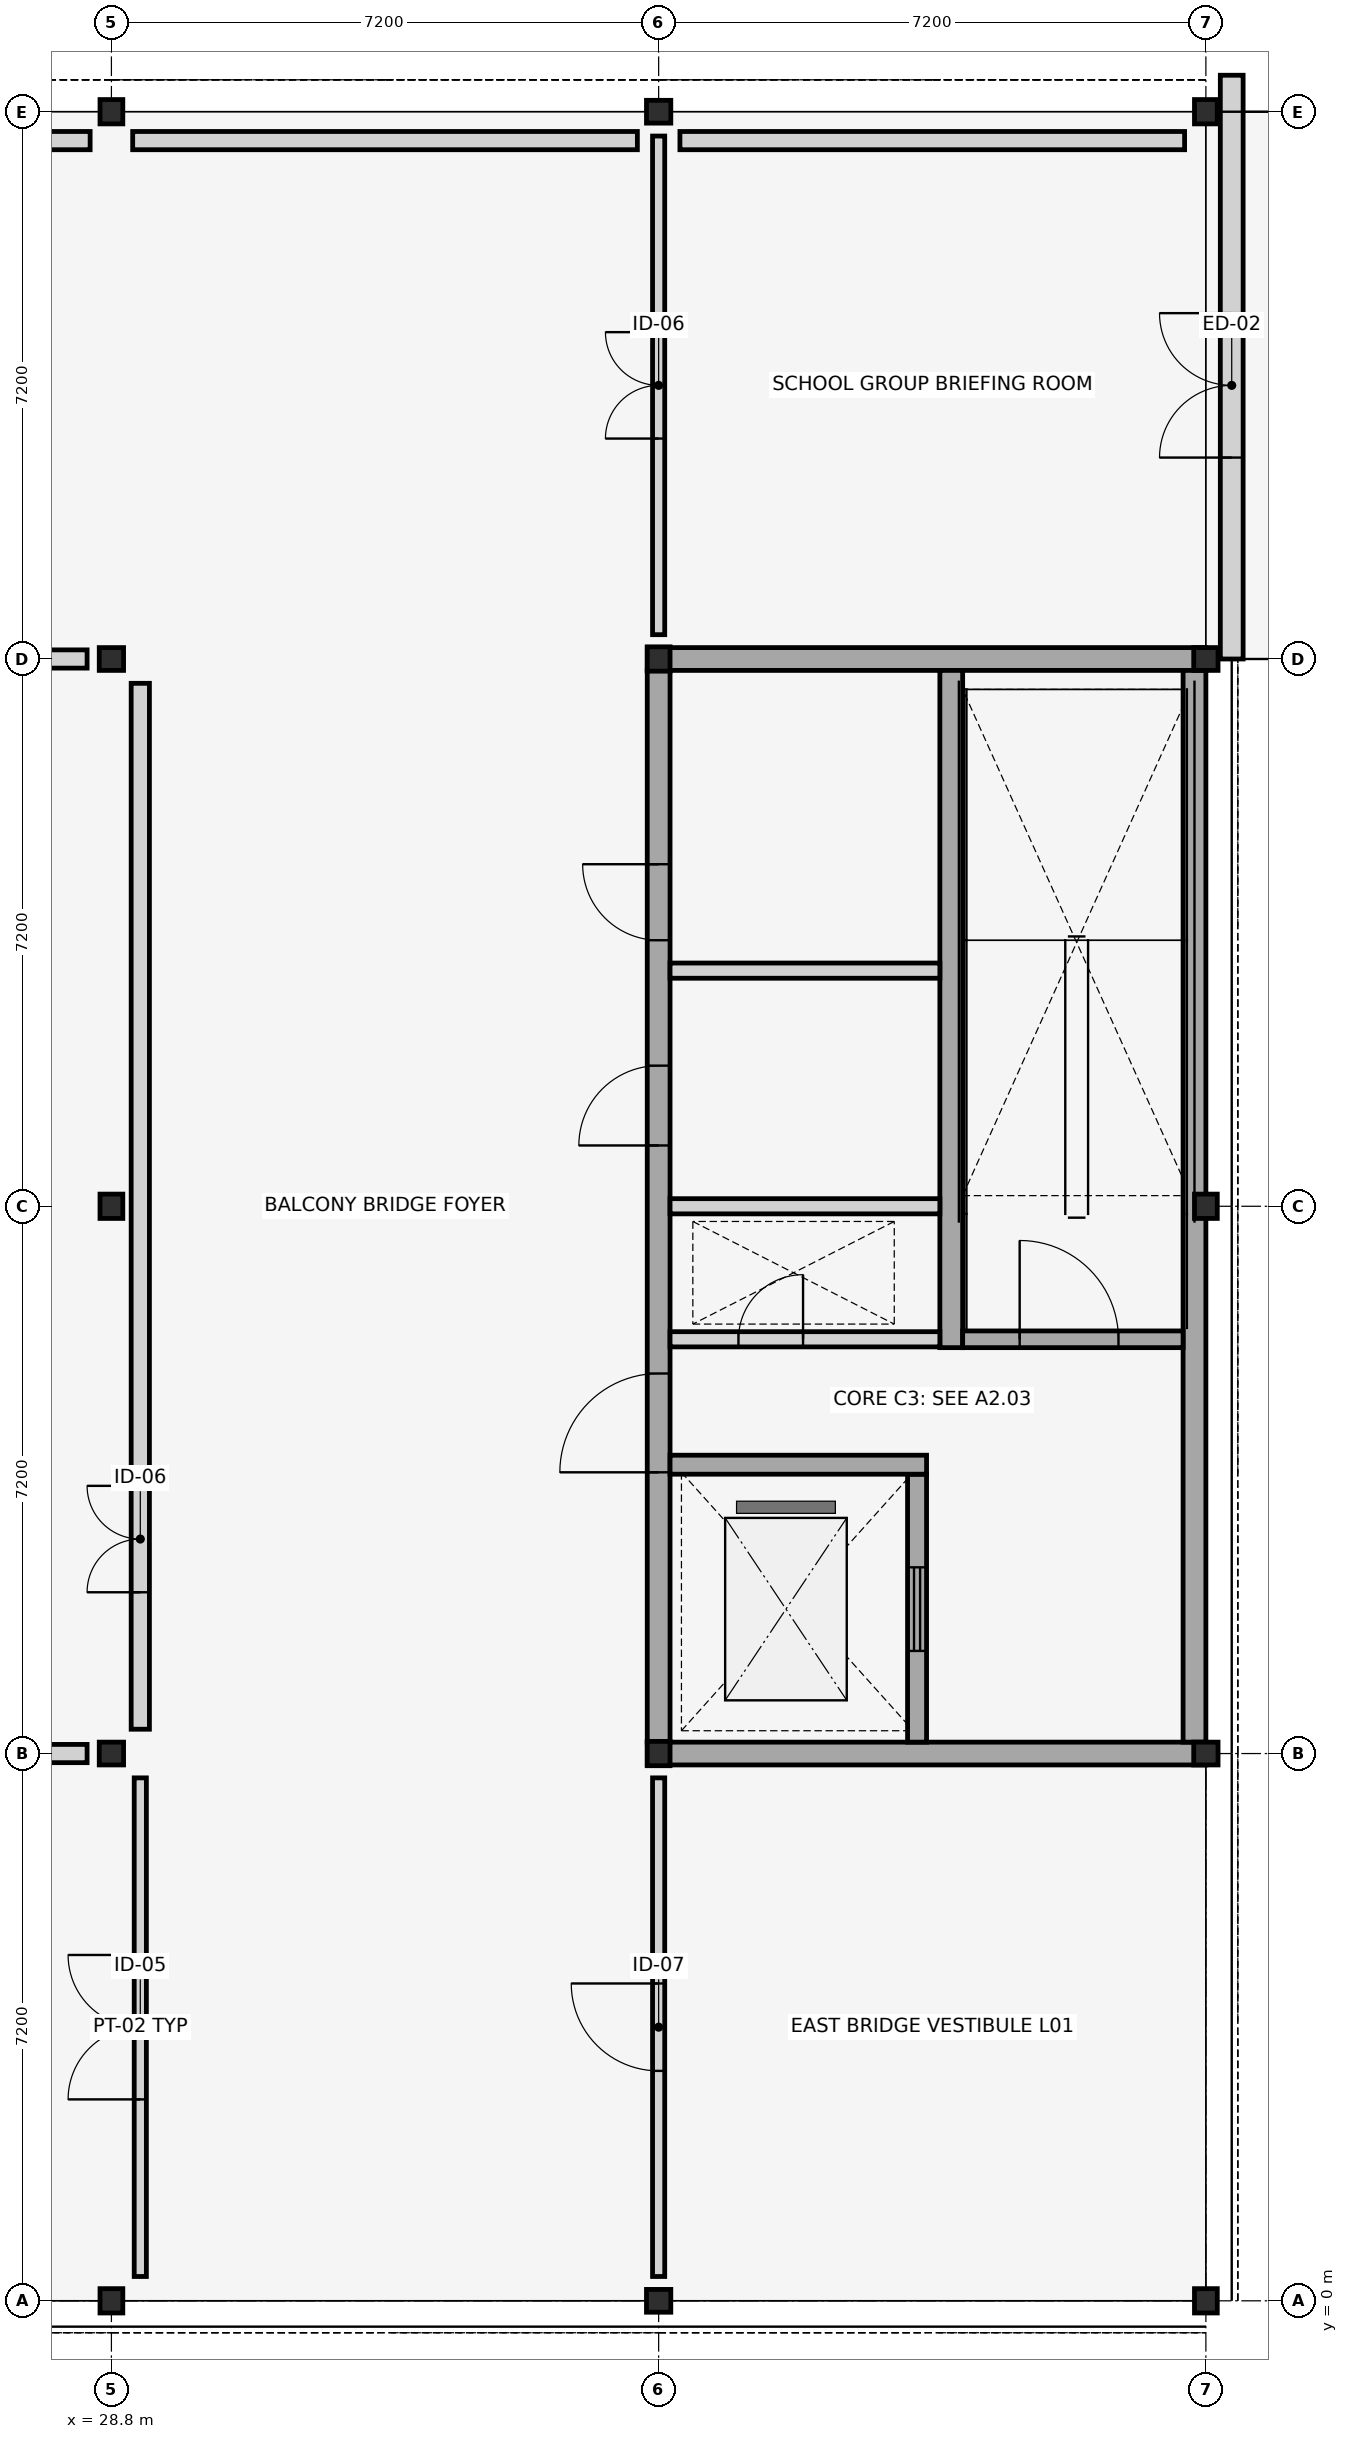
"""IFC4 building model, lengths in metres.
Left out: names, types, materials, properties, quantities, classifications, styles, units other than length and angle.
Written with IfcOpenShell. Run it as: python <this file> out.ifc"""

import sys

from ifc_helpers import new_model, si_unit, direction, frame, frame_2d, origin, origin_2d, place, context, subcontext, project, spatial, rectangle, i_section, extrude, element, fill, save


model = new_model("IFC4")
c1 = context("Model", 3, precision=1e-05, world=origin(), true_north=direction((0.0, 1.0)))
c2 = subcontext(c1, "Body", "Model", "MODEL_VIEW")
j1 = project(units=[si_unit("LENGTHUNIT", "METRE"), si_unit("PLANEANGLEUNIT", "RADIAN")], contexts=[c1])
p1 = place(None, origin())
s1 = spatial("IfcSite", under=j1, at=p1, CompositionType="ELEMENT")
p2 = place(p1, origin())
s2 = spatial("IfcBuilding", under=s1, at=p2, CompositionType="ELEMENT")
p3 = place(p2, frame((0.0, 0.0, 4.5)))
s3 = spatial("IfcBuildingStorey", under=s2, at=p3, CompositionType="ELEMENT", Elevation=4.5)
for number, where, z_axis, x_axis in (
    (1, (28.8, 0.0, 0.0), (0.0, 0.0, 1.0), (1.0, 0.0, 0.0)),
    (2, (28.8, 7.2, 0.0), (0.0, 0.0, 1.0), (0.0, 1.0, 0.0)),
    (3, (28.8, 14.4, 0.0), (0.0, 0.0, 1.0), (1.0, 0.0, 0.0)),
    (4, (28.8, 21.6, 0.0), (0.0, 0.0, 1.0), (0.0, 1.0, 0.0)),
    (5, (28.8, 28.8, 0.0), (0.0, 0.0, 1.0), (1.0, 0.0, 0.0)),
    (6, (36.0, 0.0, 0.0), (0.0, 0.0, 1.0), (0.0, 1.0, 0.0)),
    (7, (36.0, 7.2, 0.0), (0.0, 0.0, 1.0), (1.0, 0.0, 0.0)),
    (8, (36.0, 21.6, 0.0), (0.0, 0.0, 1.0), (1.0, 0.0, 0.0)),
    (9, (36.0, 28.8, 0.0), (0.0, 0.0, 1.0), (0.0, 1.0, 0.0)),
    (10, (43.2, 0.0, 0.0), (0.0, 0.0, 1.0), (1.0, 0.0, 0.0)),
    (11, (43.2, 7.2, 0.0), (0.0, 0.0, 1.0), (0.0, 1.0, 0.0)),
    (12, (43.2, 14.4, 0.0), (0.0, 0.0, 1.0), (1.0, 0.0, 0.0)),
    (13, (43.2, 21.6, 0.0), (0.0, 0.0, 1.0), (0.0, 1.0, 0.0)),
    (14, (43.2, 28.8, 0.0), (0.0, 0.0, 1.0), (1.0, 0.0, 0.0)),
):
    element("IfcColumn", number, at=place(p3, frame(where, z_axis=z_axis, x_axis=x_axis)), inside=s3, PredefinedType="COLUMN", context=c2, shape_type="SweptSolid", body=[
        extrude(i_section(OverallWidth=0.3, OverallDepth=0.32, WebThickness=0.011, FlangeThickness=0.021, FilletRadius=0.027, at=origin_2d()), origin(), (0.0, 0.0, 1.0), 4.2),
    ])
p4 = place(p3, frame((43.54, 21.6, 0.0), z_axis=(0.0, 0.0, 1.0), x_axis=(0.0, 1.0, 0.0)))
e15 = element("IfcWall", 15, at=p4, inside=s3, PredefinedType="STANDARD", context=c2, shape_type="SweptSolid", body=[
    extrude(rectangle(XDim=7.68, YDim=0.3, at=frame_2d((3.84, 0.0))), origin(), (0.0, 0.0, 1.0), 3.65),
])
p5 = place(p4, frame((2.65, 0.0, 0.0)))
e16 = element("IfcOpeningElement", 16, at=p5, cuts=e15, PredefinedType="OPENING", context=c2, shape_type="SweptSolid", body=[
    extrude(rectangle(XDim=1.9, YDim=2.45, at=frame_2d((0.95, 1.225))), frame((0.0, 0.16, 0.0), z_axis=(0.0, -1.0, 0.0), x_axis=(1.0, 0.0, 0.0)), (0.0, 0.0, 1.0), 0.32),
])
for number, where, z_axis, x_axis in (
    (17, (42.92, 28.42, 0.0), (0.0, 0.0, 1.0), (-1.0, 0.0, 0.0)),
    (18, (35.72, 28.42, 0.0), (0.0, 0.0, 1.0), (-1.0, 0.0, 0.0)),
):
    element("IfcWall", number, at=place(p3, frame(where, z_axis=z_axis, x_axis=x_axis)), inside=s3, PredefinedType="STANDARD", context=c2, shape_type="SweptSolid", body=[
        extrude(rectangle(XDim=6.64, YDim=0.24, at=frame_2d((3.32, 0.0))), origin(), (0.0, 0.0, 1.0), 3.58),
    ])
p6 = place(p3, frame((28.52, 28.42, 0.0), z_axis=(0.0, 0.0, 1.0), x_axis=(-1.0, 0.0, 0.0)))
e19 = element("IfcWall", 19, at=p6, inside=s3, PredefinedType="STANDARD", context=c2, shape_type="SweptSolid", body=[
    extrude(rectangle(XDim=6.64, YDim=0.24, at=frame_2d((3.32, 0.0))), origin(), (0.0, 0.0, 1.0), 3.58),
])
for number, where, z_axis, x_axis in (
    (20, (35.85, 7.2, 0.0), (0.0, 0.0, 1.0), (1.0, 0.0, 0.0)),
    (21, (35.85, 21.6, 0.0), (0.0, 0.0, 1.0), (1.0, 0.0, 0.0)),
):
    element("IfcWall", number, at=place(p3, frame(where, z_axis=z_axis, x_axis=x_axis)), inside=s3, PredefinedType="SHEAR", context=c2, shape_type="SweptSolid", body=[
        extrude(rectangle(XDim=7.35, YDim=0.3, at=frame_2d((3.675, 0.0))), origin(), (0.0, 0.0, 1.0), 3.98),
    ])
p7 = place(p3, frame((43.05, 7.35, 0.0), z_axis=(0.0, 0.0, 1.0), x_axis=(0.0, 1.0, 0.0)))
e22 = element("IfcWall", 22, at=p7, inside=s3, PredefinedType="SHEAR", context=c2, shape_type="SweptSolid", body=[
    extrude(rectangle(XDim=14.1, YDim=0.3, at=frame_2d((7.05, 0.0))), origin(), (0.0, 0.0, 1.0), 3.98),
])
p8 = place(p3, frame((36.0, 7.35, 0.0), z_axis=(0.0, 0.0, 1.0), x_axis=(0.0, 1.0, 0.0)))
e23 = element("IfcWall", 23, at=p8, inside=s3, PredefinedType="SHEAR", context=c2, shape_type="SweptSolid", body=[
    extrude(rectangle(XDim=14.1, YDim=0.3, at=frame_2d((7.05, 0.0))), origin(), (0.0, 0.0, 1.0), 3.98),
])
p9 = place(p8, frame((3.55, 0.0, 0.0)))
e24 = element("IfcOpeningElement", 24, at=p9, cuts=e23, PredefinedType="OPENING", context=c2, shape_type="SweptSolid", body=[
    extrude(rectangle(XDim=1.3, YDim=2.2, at=frame_2d((0.65, 1.1))), frame((0.0, 0.16, 0.0), z_axis=(0.0, -1.0, 0.0), x_axis=(1.0, 0.0, 0.0)), (0.0, 0.0, 1.0), 0.32),
])
p10 = place(p8, frame((7.85, 0.0, 0.0)))
e25 = element("IfcOpeningElement", 25, at=p10, cuts=e23, PredefinedType="OPENING", context=c2, shape_type="SweptSolid", body=[
    extrude(rectangle(XDim=1.05, YDim=2.15, at=frame_2d((0.525, 1.075))), frame((0.0, 0.16, 0.0), z_axis=(0.0, -1.0, 0.0), x_axis=(1.0, 0.0, 0.0)), (0.0, 0.0, 1.0), 0.32),
])
p11 = place(p8, frame((10.55, 0.0, 0.0)))
e26 = element("IfcOpeningElement", 26, at=p11, cuts=e23, PredefinedType="OPENING", context=c2, shape_type="SweptSolid", body=[
    extrude(rectangle(XDim=1.0, YDim=2.15, at=frame_2d((0.5, 1.075))), frame((0.0, 0.16, 0.0), z_axis=(0.0, -1.0, 0.0), x_axis=(1.0, 0.0, 0.0)), (0.0, 0.0, 1.0), 0.32),
])
p12 = place(p3, frame((39.4, 7.35, 0.0), z_axis=(0.0, 0.0, 1.0), x_axis=(0.0, 1.0, 0.0)))
e27 = element("IfcWall", 27, at=p12, inside=s3, PredefinedType="SHEAR", context=c2, shape_type="SweptSolid", body=[
    extrude(rectangle(XDim=3.525, YDim=0.25, at=frame_2d((1.762, 0.0))), origin(), (0.0, 0.0, 1.0), 3.98),
])
p13 = place(p12, frame((1.2, 0.0, 0.0)))
e28 = element("IfcOpeningElement", 28, at=p13, cuts=e27, PredefinedType="OPENING", context=c2, shape_type="SweptSolid", body=[
    extrude(rectangle(XDim=1.1, YDim=2.15, at=frame_2d((0.55, 1.075))), frame((0.0, 0.135, 0.0), z_axis=(0.0, -1.0, 0.0), x_axis=(1.0, 0.0, 0.0)), (0.0, 0.0, 1.0), 0.27),
])
p14 = place(p3, frame((39.85, 12.54, 0.0), z_axis=(0.0, 0.0, 1.0), x_axis=(0.0, 1.0, 0.0)))
e29 = element("IfcWall", 29, at=p14, inside=s3, PredefinedType="SHEAR", context=c2, shape_type="SweptSolid", body=[
    extrude(rectangle(XDim=8.91, YDim=0.3, at=frame_2d((4.455, 0.0))), origin(), (0.0, 0.0, 1.0), 3.98),
])
p15 = place(p3, frame((36.15, 12.65, 0.0), z_axis=(0.0, 0.0, 1.0), x_axis=(1.0, 0.0, 0.0)))
e30 = element("IfcWall", 30, at=p15, inside=s3, PredefinedType="PLUMBINGWALL", context=c2, shape_type="SweptSolid", body=[
    extrude(rectangle(XDim=3.55, YDim=0.2, at=frame_2d((1.775, 0.0))), origin(), (0.0, 0.0, 1.0), 3.4),
])
p16 = place(p15, frame((0.9, 0.0, 0.0)))
e31 = element("IfcOpeningElement", 31, at=p16, cuts=e30, PredefinedType="OPENING", context=c2, shape_type="SweptSolid", body=[
    extrude(rectangle(XDim=0.85, YDim=2.05, at=frame_2d((0.425, 1.025))), frame((0.0, 0.11, 0.0), z_axis=(0.0, -1.0, 0.0), x_axis=(1.0, 0.0, 0.0)), (0.0, 0.0, 1.0), 0.22),
])
p17 = place(p3, frame((40.0, 12.65, 0.0), z_axis=(0.0, 0.0, 1.0), x_axis=(1.0, 0.0, 0.0)))
e32 = element("IfcWall", 32, at=p17, inside=s3, PredefinedType="SHEAR", context=c2, shape_type="SweptSolid", body=[
    extrude(rectangle(XDim=2.9, YDim=0.22, at=frame_2d((1.45, 0.0))), origin(), (0.0, 0.0, 1.0), 3.98),
])
p18 = place(p17, frame((0.75, 0.0, 0.0)))
e33 = element("IfcOpeningElement", 33, at=p18, cuts=e32, PredefinedType="OPENING", context=c2, shape_type="SweptSolid", body=[
    extrude(rectangle(XDim=1.3, YDim=2.2, at=frame_2d((0.65, 1.1))), frame((0.0, 0.12, 0.0), z_axis=(0.0, -1.0, 0.0), x_axis=(1.0, 0.0, 0.0)), (0.0, 0.0, 1.0), 0.24),
])
p19 = place(p3, frame((36.15, 11.0, 0.0), z_axis=(0.0, 0.0, 1.0), x_axis=(1.0, 0.0, 0.0)))
e34 = element("IfcWall", 34, at=p19, inside=s3, PredefinedType="SHEAR", context=c2, shape_type="SweptSolid", body=[
    extrude(rectangle(XDim=3.375, YDim=0.25, at=frame_2d((1.688, 0.0))), origin(), (0.0, 0.0, 1.0), 3.98),
])
for number, where, z_axis, x_axis in (
    (35, (36.15, 14.4, 0.0), (0.0, 0.0, 1.0), (1.0, 0.0, 0.0)),
    (36, (36.15, 17.5, 0.0), (0.0, 0.0, 1.0), (1.0, 0.0, 0.0)),
):
    element("IfcWall", number, at=place(p3, frame(where, z_axis=z_axis, x_axis=x_axis)), inside=s3, PredefinedType="PLUMBINGWALL", context=c2, shape_type="SweptSolid", body=[
        extrude(rectangle(XDim=3.55, YDim=0.2, at=frame_2d((1.775, 0.0))), origin(), (0.0, 0.0, 1.0), 3.4),
    ])
p20 = place(p3, frame((7.52, 7.2, 0.0), z_axis=(0.0, 0.0, 1.0), x_axis=(1.0, 0.0, 0.0)))
e37 = element("IfcWall", 37, at=p20, inside=s3, PredefinedType="PARTITIONING", context=c2, shape_type="SweptSolid", body=[
    extrude(rectangle(XDim=20.96, YDim=0.24, at=frame_2d((10.48, 0.0))), origin(), (0.0, 0.0, 1.0), 3.15),
])
p21 = place(p20, frame((9.78, 0.0, 0.0)))
e38 = element("IfcOpeningElement", 38, at=p21, cuts=e37, PredefinedType="OPENING", context=c2, shape_type="SweptSolid", body=[
    extrude(rectangle(XDim=1.4, YDim=2.3, at=frame_2d((0.7, 1.15))), frame((0.0, 0.13, 0.0), z_axis=(0.0, -1.0, 0.0), x_axis=(1.0, 0.0, 0.0)), (0.0, 0.0, 1.0), 0.26),
])
p22 = place(p3, frame((7.52, 21.6, 0.0), z_axis=(0.0, 0.0, 1.0), x_axis=(1.0, 0.0, 0.0)))
e39 = element("IfcWall", 39, at=p22, inside=s3, PredefinedType="PARTITIONING", context=c2, shape_type="SweptSolid", body=[
    extrude(rectangle(XDim=20.96, YDim=0.24, at=frame_2d((10.48, 0.0))), origin(), (0.0, 0.0, 1.0), 3.15),
])
p23 = place(p22, frame((9.78, 0.0, 0.0)))
e40 = element("IfcOpeningElement", 40, at=p23, cuts=e39, PredefinedType="OPENING", context=c2, shape_type="SweptSolid", body=[
    extrude(rectangle(XDim=1.4, YDim=2.3, at=frame_2d((0.7, 1.15))), frame((0.0, 0.13, 0.0), z_axis=(0.0, -1.0, 0.0), x_axis=(1.0, 0.0, 0.0)), (0.0, 0.0, 1.0), 0.26),
])
p24 = place(p3, frame((29.18, 7.52, 0.0), z_axis=(0.0, 0.0, 1.0), x_axis=(0.0, 1.0, 0.0)))
e41 = element("IfcWall", 41, at=p24, inside=s3, PredefinedType="PARTITIONING", context=c2, shape_type="SweptSolid", body=[
    extrude(rectangle(XDim=13.76, YDim=0.24, at=frame_2d((6.88, 0.0))), origin(), (0.0, 0.0, 1.0), 3.15),
])
p25 = place(p24, frame((1.802, 0.0, 0.0)))
e42 = element("IfcOpeningElement", 42, at=p25, cuts=e41, PredefinedType="OPENING", context=c2, shape_type="SweptSolid", body=[
    extrude(rectangle(XDim=1.4, YDim=2.3, at=frame_2d((0.7, 1.15))), frame((0.0, 0.13, 0.0), z_axis=(0.0, -1.0, 0.0), x_axis=(1.0, 0.0, 0.0)), (0.0, 0.0, 1.0), 0.26),
])
p26 = place(p3, frame((29.18, 0.32, 0.0), z_axis=(0.0, 0.0, 1.0), x_axis=(0.0, 1.0, 0.0)))
e43 = element("IfcWall", 43, at=p26, inside=s3, PredefinedType="PARTITIONING", context=c2, shape_type="SweptSolid", body=[
    extrude(rectangle(XDim=6.56, YDim=0.16, at=frame_2d((3.28, 0.0))), origin(), (0.0, 0.0, 1.0), 3.15),
])
p27 = place(p26, frame((2.33, 0.0, 0.0)))
e44 = element("IfcOpeningElement", 44, at=p27, cuts=e43, PredefinedType="OPENING", context=c2, shape_type="SweptSolid", body=[
    extrude(rectangle(XDim=1.9, YDim=2.45, at=frame_2d((0.95, 1.225))), frame((0.0, 0.09, 0.0), z_axis=(0.0, -1.0, 0.0), x_axis=(1.0, 0.0, 0.0)), (0.0, 0.0, 1.0), 0.18),
])
p28 = place(p3, frame((36.0, 21.92, 0.0), z_axis=(0.0, 0.0, 1.0), x_axis=(0.0, 1.0, 0.0)))
e45 = element("IfcWall", 45, at=p28, inside=s3, PredefinedType="PARTITIONING", context=c2, shape_type="SweptSolid", body=[
    extrude(rectangle(XDim=6.56, YDim=0.16, at=frame_2d((3.28, 0.0))), origin(), (0.0, 0.0, 1.0), 3.15),
])
p29 = place(p28, frame((2.58, 0.0, 0.0)))
e46 = element("IfcOpeningElement", 46, at=p29, cuts=e45, PredefinedType="OPENING", context=c2, shape_type="SweptSolid", body=[
    extrude(rectangle(XDim=1.4, YDim=2.3, at=frame_2d((0.7, 1.15))), frame((0.0, 0.09, 0.0), z_axis=(0.0, -1.0, 0.0), x_axis=(1.0, 0.0, 0.0)), (0.0, 0.0, 1.0), 0.18),
])
p30 = place(p3, frame((36.0, 0.32, 0.0), z_axis=(0.0, 0.0, 1.0), x_axis=(0.0, 1.0, 0.0)))
e47 = element("IfcWall", 47, at=p30, inside=s3, PredefinedType="PARTITIONING", context=c2, shape_type="SweptSolid", body=[
    extrude(rectangle(XDim=6.56, YDim=0.16, at=frame_2d((3.28, 0.0))), origin(), (0.0, 0.0, 1.0), 3.15),
])
p31 = place(p30, frame((2.705, 0.0, 0.0)))
e48 = element("IfcOpeningElement", 48, at=p31, cuts=e47, PredefinedType="OPENING", context=c2, shape_type="SweptSolid", body=[
    extrude(rectangle(XDim=1.15, YDim=2.2, at=frame_2d((0.575, 1.1))), frame((0.0, 0.09, 0.0), z_axis=(0.0, -1.0, 0.0), x_axis=(1.0, 0.0, 0.0)), (0.0, 0.0, 1.0), 0.18),
])
p32 = place(p5, origin())
e49 = element("IfcDoor", 49, at=p32, inside=s3, OperationType="DOUBLE_DOOR_SINGLE_SWING", PredefinedType="DOOR", context=c2, shape_type="SweptSolid", body=[
    extrude(rectangle(XDim=1.9, YDim=2.45, at=frame_2d((0.95, 1.225))), frame((0.0, 0.025, 0.0), z_axis=(0.0, -1.0, 0.0), x_axis=(1.0, 0.0, 0.0)), (0.0, 0.0, 1.0), 0.05),
])
fill(e16, e49)
p33 = place(p9, origin())
e50 = element("IfcDoor", 50, at=p33, inside=s3, OperationType="SINGLE_SWING_LEFT", PredefinedType="DOOR", context=c2, shape_type="SweptSolid", body=[
    extrude(rectangle(XDim=1.3, YDim=2.2, at=frame_2d((0.65, 1.1))), frame((0.0, 0.025, 0.0), z_axis=(0.0, -1.0, 0.0), x_axis=(1.0, 0.0, 0.0)), (0.0, 0.0, 1.0), 0.05),
])
fill(e24, e50)
p34 = place(p10, origin())
e51 = element("IfcDoor", 51, at=p34, inside=s3, OperationType="SINGLE_SWING_LEFT", PredefinedType="DOOR", context=c2, shape_type="SweptSolid", body=[
    extrude(rectangle(XDim=1.05, YDim=2.15, at=frame_2d((0.525, 1.075))), frame((0.0, 0.025, 0.0), z_axis=(0.0, -1.0, 0.0), x_axis=(1.0, 0.0, 0.0)), (0.0, 0.0, 1.0), 0.05),
])
fill(e25, e51)
p35 = place(p11, origin())
e52 = element("IfcDoor", 52, at=p35, inside=s3, OperationType="SINGLE_SWING_RIGHT", PredefinedType="DOOR", context=c2, shape_type="SweptSolid", body=[
    extrude(rectangle(XDim=1.0, YDim=2.15, at=frame_2d((0.5, 1.075))), frame((0.0, 0.025, 0.0), z_axis=(0.0, -1.0, 0.0), x_axis=(1.0, 0.0, 0.0)), (0.0, 0.0, 1.0), 0.05),
])
fill(e26, e52)
p36 = place(p13, origin())
e53 = element("IfcDoor", 53, at=p36, inside=s3, OperationType="SLIDING_TO_LEFT", PredefinedType="DOOR", context=c2, shape_type="SweptSolid", body=[
    extrude(rectangle(XDim=1.1, YDim=2.15, at=frame_2d((0.55, 1.075))), frame((0.0, 0.025, 0.0), z_axis=(0.0, -1.0, 0.0), x_axis=(1.0, 0.0, 0.0)), (0.0, 0.0, 1.0), 0.05),
])
fill(e28, e53)
p37 = place(p16, origin())
e54 = element("IfcDoor", 54, at=p37, inside=s3, OperationType="SINGLE_SWING_RIGHT", PredefinedType="TRAPDOOR", context=c2, shape_type="SweptSolid", body=[
    extrude(rectangle(XDim=0.85, YDim=2.05, at=frame_2d((0.425, 1.025))), frame((0.0, 0.025, 0.0), z_axis=(0.0, -1.0, 0.0), x_axis=(1.0, 0.0, 0.0)), (0.0, 0.0, 1.0), 0.05),
])
fill(e31, e54)
p38 = place(p18, origin())
e55 = element("IfcDoor", 55, at=p38, inside=s3, OperationType="SINGLE_SWING_LEFT", PredefinedType="DOOR", context=c2, shape_type="SweptSolid", body=[
    extrude(rectangle(XDim=1.3, YDim=2.2, at=frame_2d((0.65, 1.1))), frame((0.0, 0.025, 0.0), z_axis=(0.0, -1.0, 0.0), x_axis=(1.0, 0.0, 0.0)), (0.0, 0.0, 1.0), 0.05),
])
fill(e33, e55)
p39 = place(p25, origin())
e56 = element("IfcDoor", 56, at=p39, inside=s3, OperationType="DOUBLE_DOOR_SINGLE_SWING", PredefinedType="DOOR", context=c2, shape_type="SweptSolid", body=[
    extrude(rectangle(XDim=1.4, YDim=2.3, at=frame_2d((0.7, 1.15))), frame((0.0, 0.025, 0.0), z_axis=(0.0, -1.0, 0.0), x_axis=(1.0, 0.0, 0.0)), (0.0, 0.0, 1.0), 0.05),
])
fill(e42, e56)
p40 = place(p27, origin())
e57 = element("IfcDoor", 57, at=p40, inside=s3, OperationType="DOUBLE_DOOR_SINGLE_SWING", PredefinedType="DOOR", context=c2, shape_type="SweptSolid", body=[
    extrude(rectangle(XDim=1.9, YDim=2.45, at=frame_2d((0.95, 1.225))), frame((0.0, 0.025, 0.0), z_axis=(0.0, -1.0, 0.0), x_axis=(1.0, 0.0, 0.0)), (0.0, 0.0, 1.0), 0.05),
])
fill(e44, e57)
p41 = place(p29, origin())
e58 = element("IfcDoor", 58, at=p41, inside=s3, OperationType="DOUBLE_DOOR_SINGLE_SWING", PredefinedType="DOOR", context=c2, shape_type="SweptSolid", body=[
    extrude(rectangle(XDim=1.4, YDim=2.3, at=frame_2d((0.7, 1.15))), frame((0.0, 0.025, 0.0), z_axis=(0.0, -1.0, 0.0), x_axis=(1.0, 0.0, 0.0)), (0.0, 0.0, 1.0), 0.05),
])
fill(e46, e58)
p42 = place(p31, origin())
e59 = element("IfcDoor", 59, at=p42, inside=s3, OperationType="SINGLE_SWING_RIGHT", PredefinedType="DOOR", context=c2, shape_type="SweptSolid", body=[
    extrude(rectangle(XDim=1.15, YDim=2.2, at=frame_2d((0.575, 1.1))), frame((0.0, 0.025, 0.0), z_axis=(0.0, -1.0, 0.0), x_axis=(1.0, 0.0, 0.0)), (0.0, 0.0, 1.0), 0.05),
])
fill(e48, e59)
save(model, sys.argv[1])
